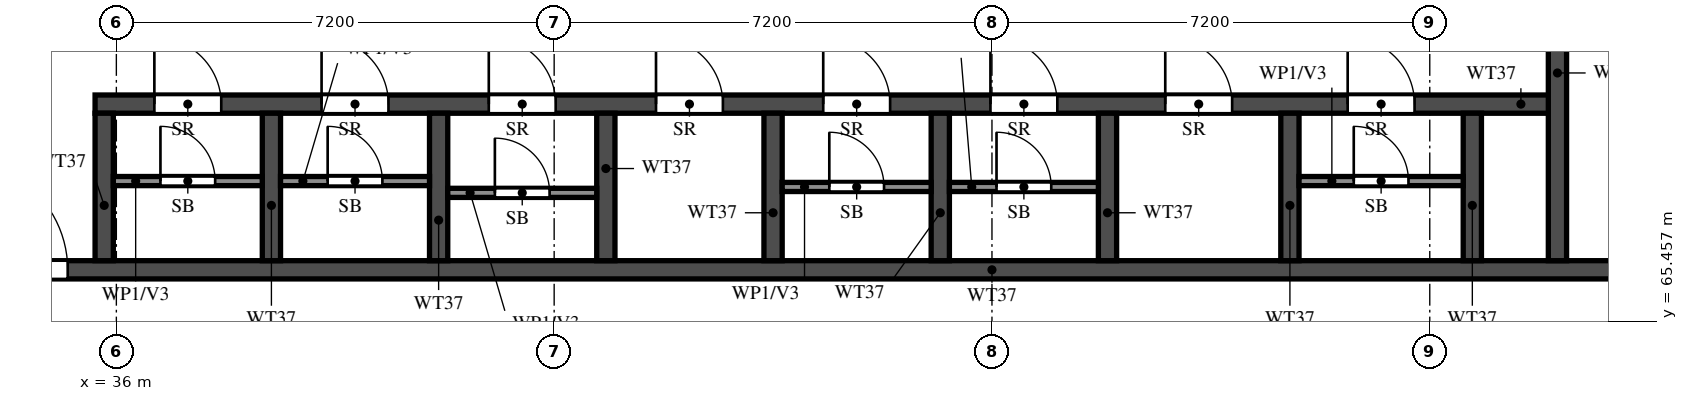
"""IFC4 building model, lengths in metres.
Left out: names, types, materials, properties, quantities, classifications, styles, units other than length and angle.
Written with IfcOpenShell. Run it as: python <this file> out.ifc"""

import sys

from ifc_helpers import new_model, si_unit, direction, frame, frame_2d, origin, place, context, subcontext, project, spatial, rectangle, extrude, element, fill, save


model = new_model("IFC4")
c1 = context("Model", 3, precision=1e-05, world=origin(), true_north=direction((0.0, 1.0)))
c2 = subcontext(c1, "Body", "Model", "MODEL_VIEW")
j1 = project(units=[si_unit("LENGTHUNIT", "METRE"), si_unit("PLANEANGLEUNIT", "RADIAN")], contexts=[c1])
p1 = place(None, origin())
s1 = spatial("IfcSite", under=j1, at=p1, CompositionType="ELEMENT")
p2 = place(p1, origin())
s2 = spatial("IfcBuilding", under=s1, at=p2, CompositionType="ELEMENT")
p3 = place(p2, frame((0.0, 0.0, 243.0)))
s3 = spatial("IfcBuildingStorey", under=s2, at=p3, CompositionType="ELEMENT", Elevation=243.0)
p4 = place(p3, frame((29.2, 66.3, 0.0), z_axis=(0.0, 0.0, 1.0), x_axis=(1.0, 0.0, 0.0)))
e1 = element("IfcWall", 1, at=p4, inside=s3, PredefinedType="SHEAR", context=c2, shape_type="SweptSolid", body=[
    extrude(rectangle(XDim=42.4, YDim=0.3, at=frame_2d((21.2, 0.0))), origin(), (0.0, 0.0, 1.0), 3.22),
])
p5 = place(p4, frame((1.425, 0.0, 0.0)))
e2 = element("IfcOpeningElement", 2, at=p5, cuts=e1, PredefinedType="OPENING", context=c2, shape_type="SweptSolid", body=[
    extrude(rectangle(XDim=1.1, YDim=2.1, at=frame_2d((0.55, 1.05))), frame((0.0, 0.16, 0.0), z_axis=(0.0, -1.0, 0.0), x_axis=(1.0, 0.0, 0.0)), (0.0, 0.0, 1.0), 0.32),
])
p6 = place(p4, frame((4.2, 0.0, 0.0)))
e3 = element("IfcOpeningElement", 3, at=p6, cuts=e1, PredefinedType="OPENING", context=c2, shape_type="SweptSolid", body=[
    extrude(rectangle(XDim=1.8, YDim=2.1, at=frame_2d((0.9, 1.05))), frame((0.0, 0.16, 0.0), z_axis=(0.0, -1.0, 0.0), x_axis=(1.0, 0.0, 0.0)), (0.0, 0.0, 1.0), 0.32),
])
p7 = place(p3, frame((35.65, 69.025, 0.0), z_axis=(0.0, 0.0, 1.0), x_axis=(1.0, 0.0, 0.0)))
e4 = element("IfcWall", 4, at=p7, inside=s3, PredefinedType="SHEAR", context=c2, shape_type="SweptSolid", body=[
    extrude(rectangle(XDim=24.05, YDim=0.3, at=frame_2d((12.025, 0.0))), origin(), (0.0, 0.0, 1.0), 3.22),
])
p8 = place(p7, frame((0.975, 0.0, 0.0)))
e5 = element("IfcOpeningElement", 5, at=p8, cuts=e4, PredefinedType="OPENING", context=c2, shape_type="SweptSolid", body=[
    extrude(rectangle(XDim=1.1, YDim=2.1, at=frame_2d((0.55, 1.05))), frame((0.0, 0.16, 0.0), z_axis=(0.0, -1.0, 0.0), x_axis=(1.0, 0.0, 0.0)), (0.0, 0.0, 1.0), 0.32),
])
p9 = place(p7, frame((3.725, 0.0, 0.0)))
e6 = element("IfcOpeningElement", 6, at=p9, cuts=e4, PredefinedType="OPENING", context=c2, shape_type="SweptSolid", body=[
    extrude(rectangle(XDim=1.1, YDim=2.1, at=frame_2d((0.55, 1.05))), frame((0.0, 0.16, 0.0), z_axis=(0.0, -1.0, 0.0), x_axis=(1.0, 0.0, 0.0)), (0.0, 0.0, 1.0), 0.32),
])
p10 = place(p7, frame((6.475, 0.0, 0.0)))
e7 = element("IfcOpeningElement", 7, at=p10, cuts=e4, PredefinedType="OPENING", context=c2, shape_type="SweptSolid", body=[
    extrude(rectangle(XDim=1.1, YDim=2.1, at=frame_2d((0.55, 1.05))), frame((0.0, 0.16, 0.0), z_axis=(0.0, -1.0, 0.0), x_axis=(1.0, 0.0, 0.0)), (0.0, 0.0, 1.0), 0.32),
])
p11 = place(p7, frame((9.225, 0.0, 0.0)))
e8 = element("IfcOpeningElement", 8, at=p11, cuts=e4, PredefinedType="OPENING", context=c2, shape_type="SweptSolid", body=[
    extrude(rectangle(XDim=1.1, YDim=2.1, at=frame_2d((0.55, 1.05))), frame((0.0, 0.16, 0.0), z_axis=(0.0, -1.0, 0.0), x_axis=(1.0, 0.0, 0.0)), (0.0, 0.0, 1.0), 0.32),
])
p12 = place(p7, frame((11.975, 0.0, 0.0)))
e9 = element("IfcOpeningElement", 9, at=p12, cuts=e4, PredefinedType="OPENING", context=c2, shape_type="SweptSolid", body=[
    extrude(rectangle(XDim=1.1, YDim=2.1, at=frame_2d((0.55, 1.05))), frame((0.0, 0.16, 0.0), z_axis=(0.0, -1.0, 0.0), x_axis=(1.0, 0.0, 0.0)), (0.0, 0.0, 1.0), 0.32),
])
p13 = place(p7, frame((14.725, 0.0, 0.0)))
e10 = element("IfcOpeningElement", 10, at=p13, cuts=e4, PredefinedType="OPENING", context=c2, shape_type="SweptSolid", body=[
    extrude(rectangle(XDim=1.1, YDim=2.1, at=frame_2d((0.55, 1.05))), frame((0.0, 0.16, 0.0), z_axis=(0.0, -1.0, 0.0), x_axis=(1.0, 0.0, 0.0)), (0.0, 0.0, 1.0), 0.32),
])
p14 = place(p7, frame((17.6, 0.0, 0.0)))
e11 = element("IfcOpeningElement", 11, at=p14, cuts=e4, PredefinedType="OPENING", context=c2, shape_type="SweptSolid", body=[
    extrude(rectangle(XDim=1.1, YDim=2.1, at=frame_2d((0.55, 1.05))), frame((0.0, 0.16, 0.0), z_axis=(0.0, -1.0, 0.0), x_axis=(1.0, 0.0, 0.0)), (0.0, 0.0, 1.0), 0.32),
])
p15 = place(p7, frame((20.6, 0.0, 0.0)))
e12 = element("IfcOpeningElement", 12, at=p15, cuts=e4, PredefinedType="OPENING", context=c2, shape_type="SweptSolid", body=[
    extrude(rectangle(XDim=1.1, YDim=2.1, at=frame_2d((0.55, 1.05))), frame((0.0, 0.16, 0.0), z_axis=(0.0, -1.0, 0.0), x_axis=(1.0, 0.0, 0.0)), (0.0, 0.0, 1.0), 0.32),
])
p16 = place(p3, frame((59.7, 66.45, 0.0), z_axis=(0.0, 0.0, 1.0), x_axis=(0.0, 1.0, 0.0)))
e13 = element("IfcWall", 13, at=p16, inside=s3, PredefinedType="SHEAR", context=c2, shape_type="SweptSolid", body=[
    extrude(rectangle(XDim=6.175, YDim=0.3, at=frame_2d((3.087, 0.0))), origin(), (0.0, 0.0, 1.0), 3.22),
])
p17 = place(p16, frame((3.85, 0.0, 0.0)))
e14 = element("IfcOpeningElement", 14, at=p17, cuts=e13, PredefinedType="OPENING", context=c2, shape_type="SweptSolid", body=[
    extrude(rectangle(XDim=1.2, YDim=2.1, at=frame_2d((0.6, 1.05))), frame((0.0, 0.16, 0.0), z_axis=(0.0, -1.0, 0.0), x_axis=(1.0, 0.0, 0.0)), (0.0, 0.0, 1.0), 0.32),
])
for number, where, z_axis, x_axis in (
    (15, (35.8, 66.45, 0.0), (0.0, 0.0, 1.0), (0.0, 1.0, 0.0)),
    (16, (38.55, 66.45, 0.0), (0.0, 0.0, 1.0), (0.0, 1.0, 0.0)),
    (17, (41.3, 66.45, 0.0), (0.0, 0.0, 1.0), (0.0, 1.0, 0.0)),
    (18, (44.05, 66.45, 0.0), (0.0, 0.0, 1.0), (0.0, 1.0, 0.0)),
    (19, (46.8, 66.45, 0.0), (0.0, 0.0, 1.0), (0.0, 1.0, 0.0)),
    (20, (49.55, 66.45, 0.0), (0.0, 0.0, 1.0), (0.0, 1.0, 0.0)),
    (21, (52.3, 66.45, 0.0), (0.0, 0.0, 1.0), (0.0, 1.0, 0.0)),
    (22, (55.3, 66.45, 0.0), (0.0, 0.0, 1.0), (0.0, 1.0, 0.0)),
    (23, (58.3, 66.45, 0.0), (0.0, 0.0, 1.0), (0.0, 1.0, 0.0)),
):
    element("IfcWall", number, at=place(p3, frame(where, z_axis=z_axis, x_axis=x_axis)), inside=s3, PredefinedType="SHEAR", context=c2, shape_type="SweptSolid", body=[
        extrude(rectangle(XDim=2.425, YDim=0.3, at=frame_2d((1.212, 0.0))), origin(), (0.0, 0.0, 1.0), 3.22),
    ])
p18 = place(p3, frame((35.95, 67.76, 0.0), z_axis=(0.0, 0.0, 1.0), x_axis=(1.0, 0.0, 0.0)))
e24 = element("IfcWall", 24, at=p18, inside=s3, PredefinedType="PARTITIONING", context=c2, shape_type="SweptSolid", body=[
    extrude(rectangle(XDim=2.45, YDim=0.15, at=frame_2d((1.225, 0.0))), origin(), (0.0, 0.0, 1.0), 3.22),
])
p19 = place(p18, frame((0.775, 0.0, 0.0)))
e25 = element("IfcOpeningElement", 25, at=p19, cuts=e24, PredefinedType="OPENING", context=c2, shape_type="SweptSolid", body=[
    extrude(rectangle(XDim=0.9, YDim=2.1, at=frame_2d((0.45, 1.05))), frame((0.0, 0.085, 0.0), z_axis=(0.0, -1.0, 0.0), x_axis=(1.0, 0.0, 0.0)), (0.0, 0.0, 1.0), 0.17),
])
p20 = place(p3, frame((38.7, 67.76, 0.0), z_axis=(0.0, 0.0, 1.0), x_axis=(1.0, 0.0, 0.0)))
e26 = element("IfcWall", 26, at=p20, inside=s3, PredefinedType="PARTITIONING", context=c2, shape_type="SweptSolid", body=[
    extrude(rectangle(XDim=2.45, YDim=0.15, at=frame_2d((1.225, 0.0))), origin(), (0.0, 0.0, 1.0), 3.22),
])
p21 = place(p20, frame((0.775, 0.0, 0.0)))
e27 = element("IfcOpeningElement", 27, at=p21, cuts=e26, PredefinedType="OPENING", context=c2, shape_type="SweptSolid", body=[
    extrude(rectangle(XDim=0.9, YDim=2.1, at=frame_2d((0.45, 1.05))), frame((0.0, 0.085, 0.0), z_axis=(0.0, -1.0, 0.0), x_axis=(1.0, 0.0, 0.0)), (0.0, 0.0, 1.0), 0.17),
])
p22 = place(p3, frame((41.45, 67.565, 0.0), z_axis=(0.0, 0.0, 1.0), x_axis=(1.0, 0.0, 0.0)))
e28 = element("IfcWall", 28, at=p22, inside=s3, PredefinedType="PARTITIONING", context=c2, shape_type="SweptSolid", body=[
    extrude(rectangle(XDim=2.45, YDim=0.15, at=frame_2d((1.225, 0.0))), origin(), (0.0, 0.0, 1.0), 3.22),
])
p23 = place(p22, frame((0.775, 0.0, 0.0)))
e29 = element("IfcOpeningElement", 29, at=p23, cuts=e28, PredefinedType="OPENING", context=c2, shape_type="SweptSolid", body=[
    extrude(rectangle(XDim=0.9, YDim=2.1, at=frame_2d((0.45, 1.05))), frame((0.0, 0.085, 0.0), z_axis=(0.0, -1.0, 0.0), x_axis=(1.0, 0.0, 0.0)), (0.0, 0.0, 1.0), 0.17),
])
p24 = place(p3, frame((46.95, 67.663, 0.0), z_axis=(0.0, 0.0, 1.0), x_axis=(1.0, 0.0, 0.0)))
e30 = element("IfcWall", 30, at=p24, inside=s3, PredefinedType="PARTITIONING", context=c2, shape_type="SweptSolid", body=[
    extrude(rectangle(XDim=2.45, YDim=0.15, at=frame_2d((1.225, 0.0))), origin(), (0.0, 0.0, 1.0), 3.22),
])
p25 = place(p24, frame((0.775, 0.0, 0.0)))
e31 = element("IfcOpeningElement", 31, at=p25, cuts=e30, PredefinedType="OPENING", context=c2, shape_type="SweptSolid", body=[
    extrude(rectangle(XDim=0.9, YDim=2.1, at=frame_2d((0.45, 1.05))), frame((0.0, 0.085, 0.0), z_axis=(0.0, -1.0, 0.0), x_axis=(1.0, 0.0, 0.0)), (0.0, 0.0, 1.0), 0.17),
])
p26 = place(p3, frame((49.7, 67.663, 0.0), z_axis=(0.0, 0.0, 1.0), x_axis=(1.0, 0.0, 0.0)))
e32 = element("IfcWall", 32, at=p26, inside=s3, PredefinedType="PARTITIONING", context=c2, shape_type="SweptSolid", body=[
    extrude(rectangle(XDim=2.45, YDim=0.15, at=frame_2d((1.225, 0.0))), origin(), (0.0, 0.0, 1.0), 3.22),
])
p27 = place(p26, frame((0.775, 0.0, 0.0)))
e33 = element("IfcOpeningElement", 33, at=p27, cuts=e32, PredefinedType="OPENING", context=c2, shape_type="SweptSolid", body=[
    extrude(rectangle(XDim=0.9, YDim=2.1, at=frame_2d((0.45, 1.05))), frame((0.0, 0.085, 0.0), z_axis=(0.0, -1.0, 0.0), x_axis=(1.0, 0.0, 0.0)), (0.0, 0.0, 1.0), 0.17),
])
p28 = place(p3, frame((55.45, 67.76, 0.0), z_axis=(0.0, 0.0, 1.0), x_axis=(1.0, 0.0, 0.0)))
e34 = element("IfcWall", 34, at=p28, inside=s3, PredefinedType="PARTITIONING", context=c2, shape_type="SweptSolid", body=[
    extrude(rectangle(XDim=2.7, YDim=0.15, at=frame_2d((1.35, 0.0))), origin(), (0.0, 0.0, 1.0), 3.22),
])
p29 = place(p28, frame((0.9, 0.0, 0.0)))
e35 = element("IfcOpeningElement", 35, at=p29, cuts=e34, PredefinedType="OPENING", context=c2, shape_type="SweptSolid", body=[
    extrude(rectangle(XDim=0.9, YDim=2.1, at=frame_2d((0.45, 1.05))), frame((0.0, 0.085, 0.0), z_axis=(0.0, -1.0, 0.0), x_axis=(1.0, 0.0, 0.0)), (0.0, 0.0, 1.0), 0.17),
])
p30 = place(p6, origin())
e36 = element("IfcDoor", 36, at=p30, inside=s3, OperationType="DOUBLE_DOOR_SINGLE_SWING", PredefinedType="DOOR", context=c2, shape_type="SweptSolid", body=[
    extrude(rectangle(XDim=1.8, YDim=2.1, at=frame_2d((0.9, 1.05))), frame((0.0, 0.025, 0.0), z_axis=(0.0, -1.0, 0.0), x_axis=(1.0, 0.0, 0.0)), (0.0, 0.0, 1.0), 0.05),
])
fill(e3, e36)
p31 = place(p8, origin())
e37 = element("IfcDoor", 37, at=p31, inside=s3, OperationType="SINGLE_SWING_RIGHT", PredefinedType="DOOR", context=c2, shape_type="SweptSolid", body=[
    extrude(rectangle(XDim=1.1, YDim=2.1, at=frame_2d((0.55, 1.05))), frame((0.0, 0.025, 0.0), z_axis=(0.0, -1.0, 0.0), x_axis=(1.0, 0.0, 0.0)), (0.0, 0.0, 1.0), 0.05),
])
fill(e5, e37)
p32 = place(p19, origin())
e38 = element("IfcDoor", 38, at=p32, inside=s3, OperationType="SINGLE_SWING_LEFT", PredefinedType="DOOR", context=c2, shape_type="SweptSolid", body=[
    extrude(rectangle(XDim=0.9, YDim=2.1, at=frame_2d((0.45, 1.05))), frame((0.0, 0.025, 0.0), z_axis=(0.0, -1.0, 0.0), x_axis=(1.0, 0.0, 0.0)), (0.0, 0.0, 1.0), 0.05),
])
fill(e25, e38)
p33 = place(p9, origin())
e39 = element("IfcDoor", 39, at=p33, inside=s3, OperationType="SINGLE_SWING_LEFT", PredefinedType="DOOR", context=c2, shape_type="SweptSolid", body=[
    extrude(rectangle(XDim=1.1, YDim=2.1, at=frame_2d((0.55, 1.05))), frame((0.0, 0.025, 0.0), z_axis=(0.0, -1.0, 0.0), x_axis=(1.0, 0.0, 0.0)), (0.0, 0.0, 1.0), 0.05),
])
fill(e6, e39)
p34 = place(p21, origin())
e40 = element("IfcDoor", 40, at=p34, inside=s3, OperationType="SINGLE_SWING_RIGHT", PredefinedType="DOOR", context=c2, shape_type="SweptSolid", body=[
    extrude(rectangle(XDim=0.9, YDim=2.1, at=frame_2d((0.45, 1.05))), frame((0.0, 0.025, 0.0), z_axis=(0.0, -1.0, 0.0), x_axis=(1.0, 0.0, 0.0)), (0.0, 0.0, 1.0), 0.05),
])
fill(e27, e40)
p35 = place(p10, origin())
e41 = element("IfcDoor", 41, at=p35, inside=s3, OperationType="SINGLE_SWING_RIGHT", PredefinedType="DOOR", context=c2, shape_type="SweptSolid", body=[
    extrude(rectangle(XDim=1.1, YDim=2.1, at=frame_2d((0.55, 1.05))), frame((0.0, 0.025, 0.0), z_axis=(0.0, -1.0, 0.0), x_axis=(1.0, 0.0, 0.0)), (0.0, 0.0, 1.0), 0.05),
])
fill(e7, e41)
p36 = place(p23, origin())
e42 = element("IfcDoor", 42, at=p36, inside=s3, OperationType="SINGLE_SWING_RIGHT", PredefinedType="DOOR", context=c2, shape_type="SweptSolid", body=[
    extrude(rectangle(XDim=0.9, YDim=2.1, at=frame_2d((0.45, 1.05))), frame((0.0, 0.025, 0.0), z_axis=(0.0, -1.0, 0.0), x_axis=(1.0, 0.0, 0.0)), (0.0, 0.0, 1.0), 0.05),
])
fill(e29, e42)
p37 = place(p11, origin())
e43 = element("IfcDoor", 43, at=p37, inside=s3, OperationType="SINGLE_SWING_LEFT", PredefinedType="DOOR", context=c2, shape_type="SweptSolid", body=[
    extrude(rectangle(XDim=1.1, YDim=2.1, at=frame_2d((0.55, 1.05))), frame((0.0, 0.025, 0.0), z_axis=(0.0, -1.0, 0.0), x_axis=(1.0, 0.0, 0.0)), (0.0, 0.0, 1.0), 0.05),
])
fill(e8, e43)
p38 = place(p12, origin())
e44 = element("IfcDoor", 44, at=p38, inside=s3, OperationType="SINGLE_SWING_RIGHT", PredefinedType="DOOR", context=c2, shape_type="SweptSolid", body=[
    extrude(rectangle(XDim=1.1, YDim=2.1, at=frame_2d((0.55, 1.05))), frame((0.0, 0.025, 0.0), z_axis=(0.0, -1.0, 0.0), x_axis=(1.0, 0.0, 0.0)), (0.0, 0.0, 1.0), 0.05),
])
fill(e9, e44)
p39 = place(p25, origin())
e45 = element("IfcDoor", 45, at=p39, inside=s3, OperationType="SINGLE_SWING_RIGHT", PredefinedType="DOOR", context=c2, shape_type="SweptSolid", body=[
    extrude(rectangle(XDim=0.9, YDim=2.1, at=frame_2d((0.45, 1.05))), frame((0.0, 0.025, 0.0), z_axis=(0.0, -1.0, 0.0), x_axis=(1.0, 0.0, 0.0)), (0.0, 0.0, 1.0), 0.05),
])
fill(e31, e45)
p40 = place(p13, origin())
e46 = element("IfcDoor", 46, at=p40, inside=s3, OperationType="SINGLE_SWING_LEFT", PredefinedType="DOOR", context=c2, shape_type="SweptSolid", body=[
    extrude(rectangle(XDim=1.1, YDim=2.1, at=frame_2d((0.55, 1.05))), frame((0.0, 0.025, 0.0), z_axis=(0.0, -1.0, 0.0), x_axis=(1.0, 0.0, 0.0)), (0.0, 0.0, 1.0), 0.05),
])
fill(e10, e46)
p41 = place(p27, origin())
e47 = element("IfcDoor", 47, at=p41, inside=s3, OperationType="SINGLE_SWING_LEFT", PredefinedType="DOOR", context=c2, shape_type="SweptSolid", body=[
    extrude(rectangle(XDim=0.9, YDim=2.1, at=frame_2d((0.45, 1.05))), frame((0.0, 0.025, 0.0), z_axis=(0.0, -1.0, 0.0), x_axis=(1.0, 0.0, 0.0)), (0.0, 0.0, 1.0), 0.05),
])
fill(e33, e47)
p42 = place(p14, origin())
e48 = element("IfcDoor", 48, at=p42, inside=s3, OperationType="SINGLE_SWING_RIGHT", PredefinedType="DOOR", context=c2, shape_type="SweptSolid", body=[
    extrude(rectangle(XDim=1.1, YDim=2.1, at=frame_2d((0.55, 1.05))), frame((0.0, 0.025, 0.0), z_axis=(0.0, -1.0, 0.0), x_axis=(1.0, 0.0, 0.0)), (0.0, 0.0, 1.0), 0.05),
])
fill(e11, e48)
p43 = place(p15, origin())
e49 = element("IfcDoor", 49, at=p43, inside=s3, OperationType="SINGLE_SWING_RIGHT", PredefinedType="DOOR", context=c2, shape_type="SweptSolid", body=[
    extrude(rectangle(XDim=1.1, YDim=2.1, at=frame_2d((0.55, 1.05))), frame((0.0, 0.025, 0.0), z_axis=(0.0, -1.0, 0.0), x_axis=(1.0, 0.0, 0.0)), (0.0, 0.0, 1.0), 0.05),
])
fill(e12, e49)
p44 = place(p29, origin())
e50 = element("IfcDoor", 50, at=p44, inside=s3, OperationType="SINGLE_SWING_LEFT", PredefinedType="DOOR", context=c2, shape_type="SweptSolid", body=[
    extrude(rectangle(XDim=0.9, YDim=2.1, at=frame_2d((0.45, 1.05))), frame((0.0, 0.025, 0.0), z_axis=(0.0, -1.0, 0.0), x_axis=(1.0, 0.0, 0.0)), (0.0, 0.0, 1.0), 0.05),
])
fill(e35, e50)
save(model, sys.argv[1])
